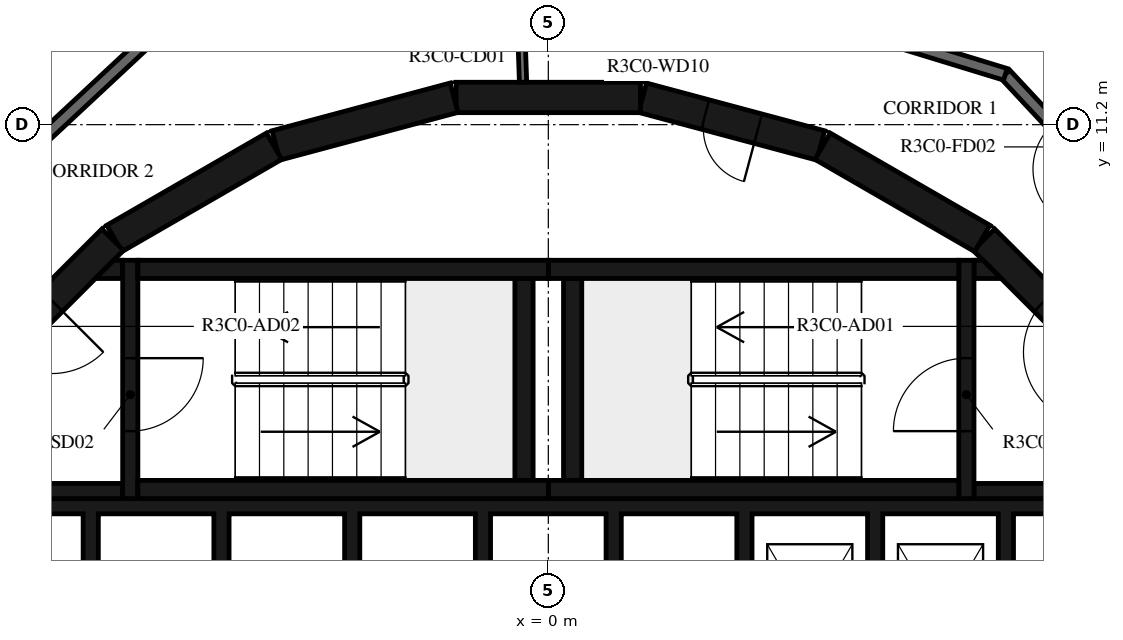
"""IFC4 building model, lengths in metres.
Left out: names, types, materials, properties, quantities, classifications, styles, units other than length and angle.
Written with IfcOpenShell. Run it as: python <this file> out.ifc"""

import sys

from ifc_helpers import new_model, si_unit, direction, frame, frame_2d, origin, place, context, subcontext, project, spatial, polyline, rectangle, outline, extrude, element, fill, save


model = new_model("IFC4")
c1 = context("Model", 3, precision=1e-05, world=origin(), true_north=direction((0.0, 1.0)))
c2 = subcontext(c1, "Body", "Model", "MODEL_VIEW")
j1 = project(units=[si_unit("LENGTHUNIT", "METRE"), si_unit("PLANEANGLEUNIT", "RADIAN")], contexts=[c1])
p1 = place(None, origin())
s1 = spatial("IfcSite", under=j1, at=p1, CompositionType="ELEMENT")
p2 = place(p1, origin())
s2 = spatial("IfcBuilding", under=s1, at=p2, CompositionType="ELEMENT")
p3 = place(p2, frame((0.0, 0.0, 141.4)))
s3 = spatial("IfcBuildingStorey", under=s2, at=p3, CompositionType="ELEMENT", Elevation=141.4)
p4 = place(p3, frame((9.308, 7.164, 0.0), z_axis=(0.0, 0.0, 1.0), x_axis=(-0.707106781187, 0.707106781187, 0.0)))
e1 = element("IfcWall", 1, at=p4, inside=s3, PredefinedType="SHEAR", context=c2, shape_type="SweptSolid", body=[
    extrude(rectangle(XDim=3.032, YDim=0.5, at=frame_2d((1.516, 0.0))), origin(), (0.0, 0.0, 1.0), 3.05),
])
p5 = place(p4, frame((0.416, 0.0, 0.0)))
e2 = element("IfcOpeningElement", 2, at=p5, cuts=e1, PredefinedType="OPENING", context=c2, shape_type="SweptSolid", body=[
    extrude(rectangle(XDim=1.2, YDim=2.1, at=frame_2d((0.6, 1.05))), frame((0.0, 0.26, 0.0), z_axis=(0.0, -1.0, 0.0), x_axis=(1.0, 0.0, 0.0)), (0.0, 0.0, 1.0), 0.52),
])
p6 = place(p3, frame((7.137, 9.329, 0.0), z_axis=(0.0, 0.0, 1.0), x_axis=(-0.865975092491, 0.500087131594, 0.0)))
e3 = element("IfcWall", 3, at=p6, inside=s3, PredefinedType="SHEAR", context=c2, shape_type="SweptSolid", body=[
    extrude(rectangle(XDim=3.033, YDim=0.5, at=frame_2d((1.516, 0.0))), origin(), (0.0, 0.0, 1.0), 3.05),
])
p7 = place(p3, frame((4.479, 10.858, 0.0), z_axis=(0.0, 0.0, 1.0), x_axis=(-0.965948410781, 0.258734743916, 0.0)))
e4 = element("IfcWall", 4, at=p7, inside=s3, PredefinedType="SHEAR", context=c2, shape_type="SweptSolid", body=[
    extrude(rectangle(XDim=3.033, YDim=0.5, at=frame_2d((1.516, 0.0))), origin(), (0.0, 0.0, 1.0), 3.05),
])
p8 = place(p7, frame((1.066, 0.0, 0.0)))
e5 = element("IfcOpeningElement", 5, at=p8, cuts=e4, PredefinedType="OPENING", context=c2, shape_type="SweptSolid", body=[
    extrude(rectangle(XDim=0.9, YDim=2.1, at=frame_2d((0.45, 1.05))), frame((0.0, 0.26, 0.0), z_axis=(0.0, -1.0, 0.0), x_axis=(1.0, 0.0, 0.0)), (0.0, 0.0, 1.0), 0.52),
])
for number, where, z_axis, x_axis in (
    (6, (1.516, 11.647, 0.0), (0.0, 0.0, 1.0), (-1.0, 0.0, 0.0)),
    (7, (-1.55, 11.643, 0.0), (0.0, 0.0, 1.0), (-0.966, -0.259, 0.0)),
    (8, (-4.51, 10.845, 0.0), (0.0, 0.0, 1.0), (-0.866, -0.5, 0.0)),
):
    element("IfcWall", number, at=place(p3, frame(where, z_axis=z_axis, x_axis=x_axis)), inside=s3, PredefinedType="SHEAR", context=c2, shape_type="SweptSolid", body=[
        extrude(rectangle(XDim=3.033, YDim=0.5, at=frame_2d((1.516, 0.0))), origin(), (0.0, 0.0, 1.0), 3.05),
    ])
p9 = place(p3, frame((-7.164, 9.308, 0.0), z_axis=(0.0, 0.0, 1.0), x_axis=(-0.707106781187, -0.707106781187, 0.0)))
e9 = element("IfcWall", 9, at=p9, inside=s3, PredefinedType="SHEAR", context=c2, shape_type="SweptSolid", body=[
    extrude(rectangle(XDim=3.032, YDim=0.5, at=frame_2d((1.516, 0.0))), origin(), (0.0, 0.0, 1.0), 3.05),
])
p10 = place(p9, frame((1.416, 0.0, 0.0)))
e10 = element("IfcOpeningElement", 10, at=p10, cuts=e9, PredefinedType="OPENING", context=c2, shape_type="SweptSolid", body=[
    extrude(rectangle(XDim=1.2, YDim=2.1, at=frame_2d((0.6, 1.05))), frame((0.0, 0.26, 0.0), z_axis=(0.0, -1.0, 0.0), x_axis=(1.0, 0.0, 0.0)), (0.0, 0.0, 1.0), 0.52),
])
for number, where, z_axis, x_axis in (
    (11, (0.0, 5.2, 0.0), (0.0, 0.0, 1.0), (1.0, 0.0, 0.0)),
    (12, (0.0, 8.82, 0.0), (0.0, 0.0, 1.0), (1.0, 0.0, 0.0)),
):
    element("IfcWall", number, at=place(p3, frame(where, z_axis=z_axis, x_axis=x_axis)), inside=s3, PredefinedType="SHEAR", context=c2, shape_type="SweptSolid", body=[
        extrude(rectangle(XDim=6.75, YDim=0.3, at=frame_2d((3.375, 0.0))), origin(), (0.0, 0.0, 1.0), 3.05),
    ])
p11 = place(p3, frame((0.4, 5.35, 0.0), z_axis=(0.0, 0.0, 1.0), x_axis=(0.0, 1.0, 0.0)))
e13 = element("IfcWall", 13, at=p11, inside=s3, PredefinedType="SHEAR", context=c2, shape_type="SweptSolid", body=[
    extrude(rectangle(XDim=3.32, YDim=0.3, at=frame_2d((1.66, 0.0))), origin(), (0.0, 0.0, 1.0), 3.05),
])
p12 = place(p3, frame((6.875, 5.05, 0.0), z_axis=(0.0, 0.0, 1.0), x_axis=(0.0, 1.0, 0.0)))
e14 = element("IfcWall", 14, at=p12, inside=s3, PredefinedType="SHEAR", context=c2, shape_type="SweptSolid", body=[
    extrude(rectangle(XDim=3.92, YDim=0.25, at=frame_2d((1.96, 0.0))), origin(), (0.0, 0.0, 1.0), 3.05),
])
p13 = place(p12, frame((1.11, 0.0, 0.0)))
e15 = element("IfcOpeningElement", 15, at=p13, cuts=e14, PredefinedType="OPENING", context=c2, shape_type="SweptSolid", body=[
    extrude(rectangle(XDim=1.2, YDim=2.1, at=frame_2d((0.6, 1.05))), frame((0.0, 0.135, 0.0), z_axis=(0.0, -1.0, 0.0), x_axis=(1.0, 0.0, 0.0)), (0.0, 0.0, 1.0), 0.27),
])
p14 = place(p3, frame((7.0, 5.175, 0.0), z_axis=(0.0, 0.0, 1.0), x_axis=(1.0, 0.0, 0.0)))
e16 = element("IfcWall", 16, at=p14, inside=s3, PredefinedType="SHEAR", context=c2, shape_type="SweptSolid", body=[
    extrude(rectangle(XDim=3.1, YDim=0.25, at=frame_2d((1.55, 0.0))), origin(), (0.0, 0.0, 1.0), 3.05),
])
p15 = place(p3, origin())
e17 = element("IfcWall", 17, at=p15, inside=s3, PredefinedType="SHEAR", context=c2, shape_type="SweptSolid", body=[
    extrude(outline(polyline([(7.448, 8.67), (7.0, 8.67), (7.0, 8.97), (7.148, 8.97), (7.448, 8.67)])), origin(), (0.0, 0.0, 1.0), 3.05),
])
for number, where, z_axis, x_axis in (
    (18, (-6.75, 5.2, 0.0), (0.0, 0.0, 1.0), (1.0, 0.0, 0.0)),
    (19, (-6.75, 8.82, 0.0), (0.0, 0.0, 1.0), (1.0, 0.0, 0.0)),
):
    element("IfcWall", number, at=place(p3, frame(where, z_axis=z_axis, x_axis=x_axis)), inside=s3, PredefinedType="SHEAR", context=c2, shape_type="SweptSolid", body=[
        extrude(rectangle(XDim=6.75, YDim=0.3, at=frame_2d((3.375, 0.0))), origin(), (0.0, 0.0, 1.0), 3.05),
    ])
p16 = place(p3, frame((-0.4, 5.35, 0.0), z_axis=(0.0, 0.0, 1.0), x_axis=(0.0, 1.0, 0.0)))
e20 = element("IfcWall", 20, at=p16, inside=s3, PredefinedType="SHEAR", context=c2, shape_type="SweptSolid", body=[
    extrude(rectangle(XDim=3.32, YDim=0.3, at=frame_2d((1.66, 0.0))), origin(), (0.0, 0.0, 1.0), 3.05),
])
p17 = place(p3, frame((-6.875, 8.97, 0.0), z_axis=(0.0, 0.0, 1.0), x_axis=(0.0, -1.0, 0.0)))
e21 = element("IfcWall", 21, at=p17, inside=s3, PredefinedType="SHEAR", context=c2, shape_type="SweptSolid", body=[
    extrude(rectangle(XDim=3.92, YDim=0.25, at=frame_2d((1.96, 0.0))), origin(), (0.0, 0.0, 1.0), 3.05),
])
p18 = place(p17, frame((1.61, 0.0, 0.0)))
e22 = element("IfcOpeningElement", 22, at=p18, cuts=e21, PredefinedType="OPENING", context=c2, shape_type="SweptSolid", body=[
    extrude(rectangle(XDim=1.2, YDim=2.1, at=frame_2d((0.6, 1.05))), frame((0.0, 0.135, 0.0), z_axis=(0.0, -1.0, 0.0), x_axis=(1.0, 0.0, 0.0)), (0.0, 0.0, 1.0), 0.27),
])
p19 = place(p3, frame((-7.0, 5.175, 0.0), z_axis=(0.0, 0.0, 1.0), x_axis=(-1.0, 0.0, 0.0)))
e23 = element("IfcWall", 23, at=p19, inside=s3, PredefinedType="SHEAR", context=c2, shape_type="SweptSolid", body=[
    extrude(rectangle(XDim=3.1, YDim=0.25, at=frame_2d((1.55, 0.0))), origin(), (0.0, 0.0, 1.0), 3.05),
])
p20 = place(p3, origin())
e24 = element("IfcWall", 24, at=p20, inside=s3, PredefinedType="SHEAR", context=c2, shape_type="SweptSolid", body=[
    extrude(outline(polyline([(-7.148, 8.97), (-7.0, 8.97), (-7.0, 8.67), (-7.448, 8.67), (-7.148, 8.97)])), origin(), (0.0, 0.0, 1.0), 3.05),
])
p21 = place(p3, origin())
e25 = element("IfcWall", 25, at=p21, inside=s3, PredefinedType="SHEAR", context=c2, shape_type="SweptSolid", body=[
    extrude(outline(polyline([(-9.55, 4.8), (-7.65, 4.8), (-7.65, 1.9), (-7.4, 1.9), (-7.4, 4.8), (-5.5, 4.8), (-5.5, 1.9), (-5.25, 1.9), (-5.25, 4.8), (-3.35, 4.8), (-3.35, 1.9), (-3.1, 1.9), (-3.1, 4.8), (-1.2, 4.8), (-1.2, 1.9), (-0.95, 1.9), (-0.95, 4.8), (0.95, 4.8), (0.95, 1.9), (1.2, 1.9), (1.2, 4.8), (3.1, 4.8), (3.1, 1.9), (3.35, 1.9), (3.35, 4.8), (5.25, 4.8), (5.25, 1.9), (5.5, 1.9), (5.5, 4.8), (7.4, 4.8), (7.4, 1.9), (7.65, 1.9), (7.65, 4.8), (9.55, 4.8), (9.55, 1.9), (9.8, 1.9), (9.8, 4.8), (9.8, 5.05), (-9.8, 5.05), (-9.8, 4.8), (-9.8, 1.9), (-9.55, 1.9), (-9.55, 4.8)])), origin(), (0.0, 0.0, 1.0), 3.05),
])
p22 = place(p3, frame((-0.487, 13.948, 0.0), z_axis=(0.0, 0.0, 1.0), x_axis=(0.034859752231, -0.999392214135, 0.0)))
e26 = element("IfcWall", 26, at=p22, inside=s3, PredefinedType="PARTITIONING", context=c2, shape_type="SweptSolid", body=[
    extrude(rectangle(XDim=2.052, YDim=0.12, at=frame_2d((1.026, 0.0))), origin(), (0.0, 0.0, 1.0), 3.05),
])
p23 = place(p22, frame((0.125, 0.0, 0.0)))
e27 = element("IfcOpeningElement", 27, at=p23, cuts=e26, PredefinedType="OPENING", context=c2, shape_type="SweptSolid", body=[
    extrude(rectangle(XDim=1.2, YDim=2.1, at=frame_2d((0.6, 1.05))), frame((0.0, 0.07, 0.0), z_axis=(0.0, -1.0, 0.0), x_axis=(1.0, 0.0, 0.0)), (0.0, 0.0, 1.0), 0.14),
])
p24 = place(p3, frame((12.523, 6.659, 0.0), z_axis=(0.0, 0.0, 1.0), x_axis=(-0.682001841105, 0.731350455479, 0.0)))
e28 = element("IfcWall", 28, at=p24, inside=s3, PredefinedType="STANDARD", context=c2, shape_type="SweptSolid", body=[
    extrude(rectangle(XDim=7.342, YDim=0.2, at=frame_2d((3.671, 0.0))), origin(), (0.0, 0.0, 1.0), 3.05),
])
p25 = place(p24, frame((3.0, 0.0, 0.0)))
e29 = element("IfcOpeningElement", 29, at=p25, cuts=e28, PredefinedType="OPENING", context=c2, shape_type="SweptSolid", body=[
    extrude(rectangle(XDim=1.0, YDim=2.1, at=frame_2d((0.5, 1.05))), frame((0.0, 0.11, 0.0), z_axis=(0.0, -1.0, 0.0), x_axis=(1.0, 0.0, 0.0)), (0.0, 0.0, 1.0), 0.22),
])
p26 = place(p24, frame((5.209, 0.0, 0.0)))
e30 = element("IfcOpeningElement", 30, at=p26, cuts=e28, PredefinedType="OPENING", context=c2, shape_type="SweptSolid", body=[
    extrude(rectangle(XDim=1.0, YDim=2.1, at=frame_2d((0.5, 1.05))), frame((0.0, 0.11, 0.0), z_axis=(0.0, -1.0, 0.0), x_axis=(1.0, 0.0, 0.0)), (0.0, 0.0, 1.0), 0.22),
])
p27 = place(p3, frame((7.516, 12.028, 0.0), z_axis=(0.0, 0.0, 1.0), x_axis=(-0.956306642771, 0.292365533182, 0.0)))
e31 = element("IfcWall", 31, at=p27, inside=s3, PredefinedType="STANDARD", context=c2, shape_type="SweptSolid", body=[
    extrude(rectangle(XDim=7.342, YDim=0.2, at=frame_2d((3.671, 0.0))), origin(), (0.0, 0.0, 1.0), 3.05),
])
p28 = place(p3, frame((-6.659, 12.523, 0.0), z_axis=(0.0, 0.0, 1.0), x_axis=(-0.731350455479, -0.682001841105, 0.0)))
e32 = element("IfcWall", 32, at=p28, inside=s3, PredefinedType="STANDARD", context=c2, shape_type="SweptSolid", body=[
    extrude(rectangle(XDim=7.342, YDim=0.2, at=frame_2d((3.671, 0.0))), origin(), (0.0, 0.0, 1.0), 3.05),
])
p29 = place(p28, frame((4.2, 0.0, 0.0)))
e33 = element("IfcOpeningElement", 33, at=p29, cuts=e32, PredefinedType="OPENING", context=c2, shape_type="SweptSolid", body=[
    extrude(rectangle(XDim=1.0, YDim=2.1, at=frame_2d((0.5, 1.05))), frame((0.0, 0.11, 0.0), z_axis=(0.0, -1.0, 0.0), x_axis=(1.0, 0.0, 0.0)), (0.0, 0.0, 1.0), 0.22),
])
p30 = place(p3, frame((-1.539, 24.071, 0.0), z_axis=(0.0, 0.0, 1.0), x_axis=(0.68200220595, -0.731350115252, 0.0)))
e34 = element("IfcWall", 34, at=p30, inside=s3, PredefinedType="PARTITIONING", context=c2, shape_type="SweptSolid", body=[
    extrude(rectangle(XDim=17.316, YDim=0.12, at=frame_2d((8.658, 0.0))), origin(), (0.0, 0.0, 1.0), 3.05),
])
p31 = place(p30, frame((3.323, 0.0, 0.0)))
e35 = element("IfcOpeningElement", 35, at=p31, cuts=e34, PredefinedType="OPENING", context=c2, shape_type="SweptSolid", body=[
    extrude(rectangle(XDim=0.9, YDim=2.1, at=frame_2d((0.45, 1.05))), frame((0.0, 0.07, 0.0), z_axis=(0.0, -1.0, 0.0), x_axis=(1.0, 0.0, 0.0)), (0.0, 0.0, 1.0), 0.14),
])
p32 = place(p30, frame((0.2, 0.0, 0.0)))
e36 = element("IfcOpeningElement", 36, at=p32, cuts=e34, PredefinedType="OPENING", context=c2, shape_type="SweptSolid", body=[
    extrude(rectangle(XDim=0.9, YDim=2.1, at=frame_2d((0.45, 1.05))), frame((0.0, 0.07, 0.0), z_axis=(0.0, -1.0, 0.0), x_axis=(1.0, 0.0, 0.0)), (0.0, 0.0, 1.0), 0.14),
])
p33 = place(p3, frame((-7.388, 13.894, 0.0), z_axis=(0.0, 0.0, 1.0), x_axis=(-0.731357186721, -0.681994622729, 0.0)))
e37 = element("IfcWall", 37, at=p33, inside=s3, PredefinedType="PARTITIONING", context=c2, shape_type="SweptSolid", body=[
    extrude(rectangle(XDim=8.146, YDim=0.12, at=frame_2d((4.073, 0.0))), origin(), (0.0, 0.0, 1.0), 3.05),
])
p34 = place(p33, frame((0.725, 0.0, 0.0)))
e38 = element("IfcOpeningElement", 38, at=p34, cuts=e37, PredefinedType="OPENING", context=c2, shape_type="SweptSolid", body=[
    extrude(rectangle(XDim=0.8, YDim=2.1, at=frame_2d((0.4, 1.05))), frame((0.0, 0.07, 0.0), z_axis=(0.0, -1.0, 0.0), x_axis=(1.0, 0.0, 0.0)), (0.0, 0.0, 1.0), 0.14),
])
p35 = place(p33, frame((6.927, 0.0, 0.0)))
e39 = element("IfcOpeningElement", 39, at=p35, cuts=e37, PredefinedType="OPENING", context=c2, shape_type="SweptSolid", body=[
    extrude(rectangle(XDim=0.9, YDim=2.1, at=frame_2d((0.45, 1.05))), frame((0.0, 0.07, 0.0), z_axis=(0.0, -1.0, 0.0), x_axis=(1.0, 0.0, 0.0)), (0.0, 0.0, 1.0), 0.14),
])
p36 = place(p13, origin())
e40 = element("IfcDoor", 40, at=p36, inside=s3, OperationType="SINGLE_SWING_LEFT", PredefinedType="DOOR", context=c2, shape_type="SweptSolid", body=[
    extrude(rectangle(XDim=1.2, YDim=2.1, at=frame_2d((0.6, 1.05))), frame((0.0, 0.025, 0.0), z_axis=(0.0, -1.0, 0.0), x_axis=(1.0, 0.0, 0.0)), (0.0, 0.0, 1.0), 0.05),
])
fill(e15, e40)
p37 = place(p5, origin())
e41 = element("IfcDoor", 41, at=p37, inside=s3, OperationType="SINGLE_SWING_RIGHT", PredefinedType="DOOR", context=c2, shape_type="SweptSolid", body=[
    extrude(rectangle(XDim=1.2, YDim=2.1, at=frame_2d((0.6, 1.05))), frame((0.0, 0.025, 0.0), z_axis=(0.0, -1.0, 0.0), x_axis=(1.0, 0.0, 0.0)), (0.0, 0.0, 1.0), 0.05),
])
fill(e2, e41)
p38 = place(p18, origin())
e42 = element("IfcDoor", 42, at=p38, inside=s3, OperationType="SINGLE_SWING_LEFT", PredefinedType="DOOR", context=c2, shape_type="SweptSolid", body=[
    extrude(rectangle(XDim=1.2, YDim=2.1, at=frame_2d((0.6, 1.05))), frame((0.0, 0.025, 0.0), z_axis=(0.0, -1.0, 0.0), x_axis=(1.0, 0.0, 0.0)), (0.0, 0.0, 1.0), 0.05),
])
fill(e22, e42)
p39 = place(p10, origin())
e43 = element("IfcDoor", 43, at=p39, inside=s3, OperationType="SINGLE_SWING_RIGHT", PredefinedType="DOOR", context=c2, shape_type="SweptSolid", body=[
    extrude(rectangle(XDim=1.2, YDim=2.1, at=frame_2d((0.6, 1.05))), frame((0.0, 0.025, 0.0), z_axis=(0.0, -1.0, 0.0), x_axis=(1.0, 0.0, 0.0)), (0.0, 0.0, 1.0), 0.05),
])
fill(e10, e43)
p40 = place(p8, origin())
e44 = element("IfcDoor", 44, at=p40, inside=s3, OperationType="SINGLE_SWING_LEFT", PredefinedType="DOOR", context=c2, shape_type="SweptSolid", body=[
    extrude(rectangle(XDim=0.9, YDim=2.1, at=frame_2d((0.45, 1.05))), frame((0.0, 0.025, 0.0), z_axis=(0.0, -1.0, 0.0), x_axis=(1.0, 0.0, 0.0)), (0.0, 0.0, 1.0), 0.05),
])
fill(e5, e44)
save(model, sys.argv[1])
